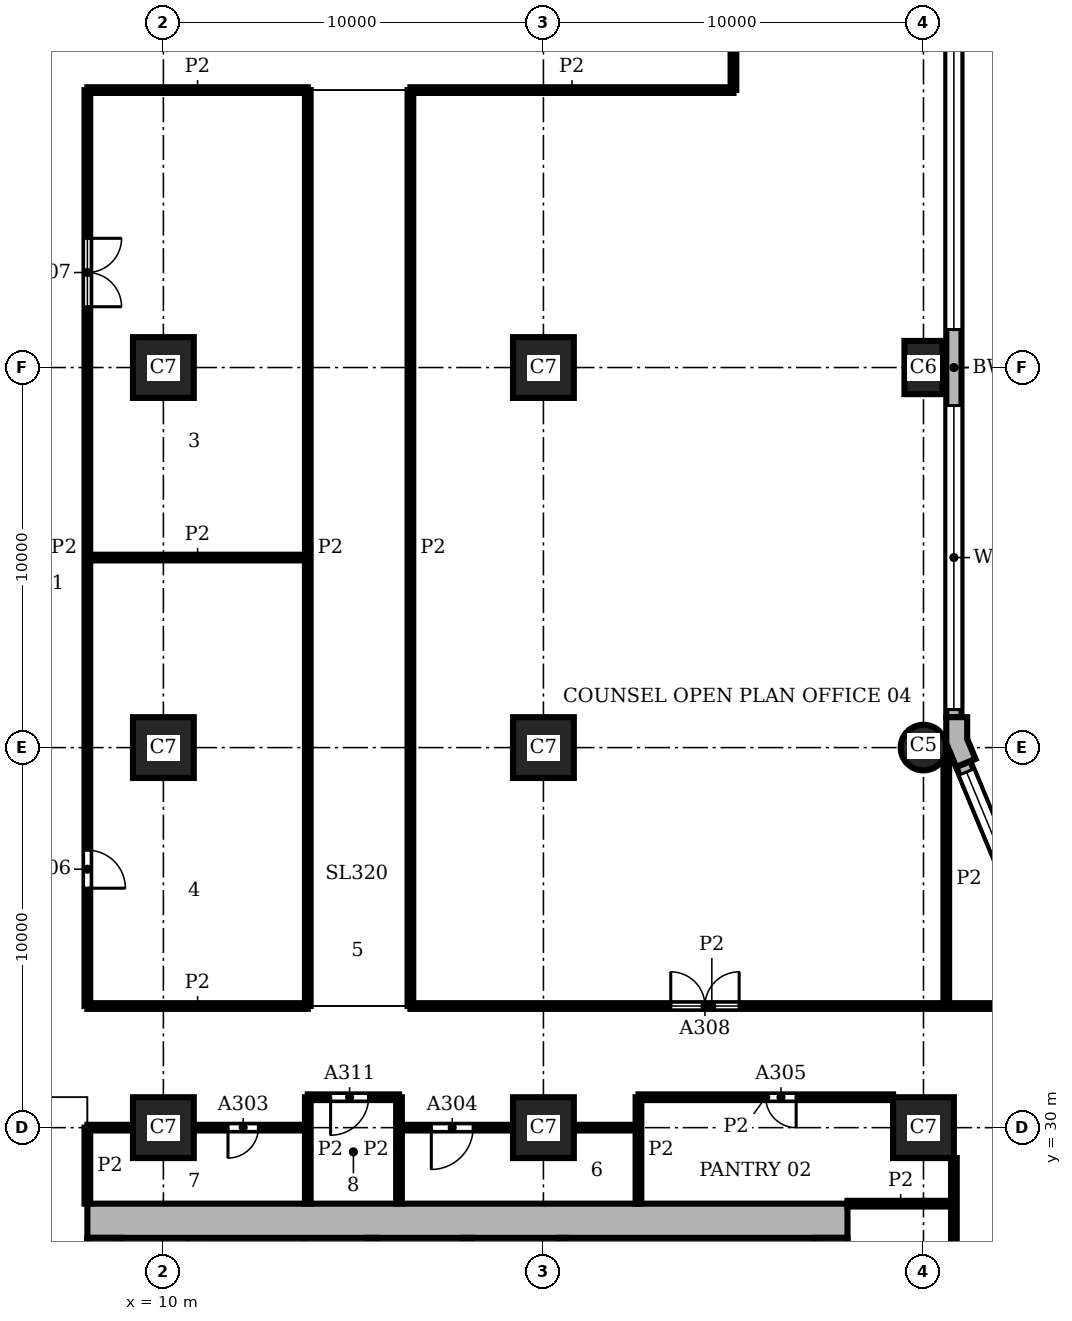
"""IFC4 building model, lengths in metres.
Left out: names, types, materials, properties, quantities, classifications, styles, units other than length and angle.
Written with IfcOpenShell. Run it as: python <this file> out.ifc"""

import sys

from ifc_helpers import new_model, si_unit, direction, frame, frame_2d, origin, origin_2d, place, context, subcontext, project, spatial, polyline, rectangle, circle, outline, extrude, element, fill, save


model = new_model("IFC4")
c1 = context("Model", 3, precision=1e-05, world=origin(), true_north=direction((0.0, 1.0)))
c2 = subcontext(c1, "Body", "Model", "MODEL_VIEW")
j1 = project(units=[si_unit("LENGTHUNIT", "METRE"), si_unit("PLANEANGLEUNIT", "RADIAN")], contexts=[c1])
p1 = place(None, origin())
s1 = spatial("IfcSite", under=j1, at=p1, CompositionType="ELEMENT")
p2 = place(p1, origin())
s2 = spatial("IfcBuilding", under=s1, at=p2, CompositionType="ELEMENT")
p3 = place(p2, frame((0.0, 0.0, 35.4)))
s3 = spatial("IfcBuildingStorey", under=s2, at=p3, CompositionType="ELEMENT", Elevation=35.4)
p4 = place(p3, frame((30.0, 40.0, 0.0), z_axis=(0.0, 0.0, 1.0), x_axis=(1.0, 0.0, 0.0)))
e1 = element("IfcColumn", 1, at=p4, inside=s3, PredefinedType="COLUMN", context=c2, shape_type="SweptSolid", body=[
    extrude(circle(Radius=0.6, at=origin_2d()), origin(), (0.0, 0.0, 1.0), 3.9),
])
p5 = place(p3, frame((30.0, 50.0, 0.0), z_axis=(0.0, 0.0, 1.0), x_axis=(0.0, 1.0, 0.0)))
e2 = element("IfcColumn", 2, at=p5, inside=s3, PredefinedType="COLUMN", context=c2, shape_type="SweptSolid", body=[
    extrude(rectangle(XDim=1.4, YDim=1.0, at=origin_2d()), origin(), (0.0, 0.0, 1.0), 3.9),
])
for number, where, z_axis, x_axis in (
    (3, (10.0, 30.0, 0.0), (0.0, 0.0, 1.0), (1.0, 0.0, 0.0)),
    (4, (10.0, 40.0, 0.0), (0.0, 0.0, 1.0), (1.0, 0.0, 0.0)),
    (5, (10.0, 50.0, 0.0), (0.0, 0.0, 1.0), (1.0, 0.0, 0.0)),
    (6, (20.0, 30.0, 0.0), (0.0, 0.0, 1.0), (1.0, 0.0, 0.0)),
    (7, (20.0, 40.0, 0.0), (0.0, 0.0, 1.0), (1.0, 0.0, 0.0)),
    (8, (20.0, 50.0, 0.0), (0.0, 0.0, 1.0), (1.0, 0.0, 0.0)),
    (9, (30.0, 30.0, 0.0), (0.0, 0.0, 1.0), (1.0, 0.0, 0.0)),
):
    element("IfcColumn", number, at=place(p3, frame(where, z_axis=z_axis, x_axis=x_axis)), inside=s3, PredefinedType="COLUMN", context=c2, shape_type="SweptSolid", body=[
        extrude(rectangle(XDim=1.6, YDim=1.6, at=origin_2d()), origin(), (0.0, 0.0, 1.0), 3.9),
    ])
p6 = place(p3, frame((27.55, 8.9, 0.0), z_axis=(0.0, 0.0, 1.0), x_axis=(0.0, 1.0, 0.0)))
e10 = element("IfcWall", 10, at=p6, inside=s3, PredefinedType="SHEAR", context=c2, shape_type="SweptSolid", body=[
    extrude(rectangle(XDim=18.2, YDim=0.9, at=frame_2d((9.1, 0.0))), origin(), (0.0, 0.0, 1.0), 3.9),
])
p7 = place(p6, frame((4.55, 0.0, 0.0)))
e11 = element("IfcOpeningElement", 11, at=p7, cuts=e10, PredefinedType="OPENING", context=c2, shape_type="SweptSolid", body=[
    extrude(rectangle(XDim=1.6, YDim=2.1, at=frame_2d((0.8, 1.05))), frame((0.0, 0.46, 0.0), z_axis=(0.0, -1.0, 0.0), x_axis=(1.0, 0.0, 0.0)), (0.0, 0.0, 1.0), 0.92),
])
p8 = place(p3, frame((28.0, 27.55, 0.0), z_axis=(0.0, 0.0, 1.0), x_axis=(-1.0, 0.0, 0.0)))
e12 = element("IfcWall", 12, at=p8, inside=s3, PredefinedType="SHEAR", context=c2, shape_type="SweptSolid", body=[
    extrude(rectangle(XDim=20.0, YDim=0.9, at=frame_2d((10.0, 0.0))), origin(), (0.0, 0.0, 1.0), 3.9),
])
p9 = place(p3, frame((8.45, 27.1, 0.0), z_axis=(0.0, 0.0, 1.0), x_axis=(0.0, -1.0, 0.0)))
e13 = element("IfcWall", 13, at=p9, inside=s3, PredefinedType="SHEAR", context=c2, shape_type="SweptSolid", body=[
    extrude(rectangle(XDim=18.2, YDim=0.9, at=frame_2d((9.1, 0.0))), origin(), (0.0, 0.0, 1.0), 3.9),
])
p10 = place(p3, origin())
e14 = element("IfcWall", 14, at=p10, inside=s3, PredefinedType="SOLIDWALL", context=c2, shape_type="SweptSolid", body=[
    extrude(outline(polyline([(31.23, 39.644), (31.369, 39.701), (31.15, 40.229), (31.15, 40.8), (31.0, 40.8), (30.6, 40.8), (30.6, 40.119), (30.861, 39.49), (31.23, 39.644)])), origin(), (0.0, 0.0, 1.0), 3.9),
])
p11 = place(p3, frame((33.362, 33.974, 0.0), z_axis=(0.0, 0.0, 1.0), x_axis=(-0.382655745237, 0.923891000409, 0.0)))
e15 = element("IfcWall", 15, at=p11, inside=s3, PredefinedType="SOLIDWALL", context=c2, shape_type="SweptSolid", body=[
    extrude(rectangle(XDim=6.053, YDim=0.4, at=frame_2d((3.027, 0.0))), origin(), (0.0, 0.0, 1.0), 3.9),
])
p12 = place(p11, frame((0.227, 0.0, 0.9)))
e16 = element("IfcOpeningElement", 16, at=p12, cuts=e15, PredefinedType="OPENING", context=c2, shape_type="SweptSolid", body=[
    extrude(rectangle(XDim=5.6, YDim=2.35, at=frame_2d((2.8, 1.175))), frame((0.0, 0.21, 0.0), z_axis=(0.0, -1.0, 0.0), x_axis=(1.0, 0.0, 0.0)), (0.0, 0.0, 1.0), 0.42),
])
p13 = place(p3, frame((30.8, 40.8, 0.0), z_axis=(0.0, 0.0, 1.0), x_axis=(0.0, 1.0, 0.0)))
e17 = element("IfcWall", 17, at=p13, inside=s3, PredefinedType="SOLIDWALL", context=c2, shape_type="SweptSolid", body=[
    extrude(rectangle(XDim=18.4, YDim=0.4, at=frame_2d((9.2, 0.0))), origin(), (0.0, 0.0, 1.0), 3.9),
])
p14 = place(p13, frame((0.2, 0.0, 0.9)))
e18 = element("IfcOpeningElement", 18, at=p14, cuts=e17, PredefinedType="OPENING", context=c2, shape_type="SweptSolid", body=[
    extrude(rectangle(XDim=8.0, YDim=2.35, at=frame_2d((4.0, 1.175))), frame((0.0, 0.21, 0.0), z_axis=(0.0, -1.0, 0.0), x_axis=(1.0, 0.0, 0.0)), (0.0, 0.0, 1.0), 0.42),
])
p15 = place(p13, frame((10.2, 0.0, 0.9)))
e19 = element("IfcOpeningElement", 19, at=p15, cuts=e17, PredefinedType="OPENING", context=c2, shape_type="SweptSolid", body=[
    extrude(rectangle(XDim=8.0, YDim=2.35, at=frame_2d((4.0, 1.175))), frame((0.0, 0.21, 0.0), z_axis=(0.0, -1.0, 0.0), x_axis=(1.0, 0.0, 0.0)), (0.0, 0.0, 1.0), 0.42),
])
p16 = place(p3, frame((15.5, 23.6, 0.0), z_axis=(0.0, 0.0, 1.0), x_axis=(0.0, 1.0, 0.0)))
e20 = element("IfcWall", 20, at=p16, inside=s3, PredefinedType="SHEAR", context=c2, shape_type="SweptSolid", body=[
    extrude(rectangle(XDim=3.5, YDim=0.2, at=frame_2d((1.75, 0.0))), origin(), (0.0, 0.0, 1.0), 3.58),
])
p17 = place(p3, frame((18.0, 20.0, 0.0), z_axis=(0.0, 0.0, 1.0), x_axis=(0.0, 1.0, 0.0)))
e21 = element("IfcWall", 21, at=p17, inside=s3, PredefinedType="SHEAR", context=c2, shape_type="SweptSolid", body=[
    extrude(rectangle(XDim=7.1, YDim=0.2, at=frame_2d((3.55, 0.0))), origin(), (0.0, 0.0, 1.0), 3.58),
])
p18 = place(p17, frame((1.2, 0.0, 0.0)))
e22 = element("IfcOpeningElement", 22, at=p18, cuts=e21, PredefinedType="OPENING", context=c2, shape_type="SweptSolid", body=[
    extrude(rectangle(XDim=1.2, YDim=2.1, at=frame_2d((0.6, 1.05))), frame((0.0, 0.11, 0.0), z_axis=(0.0, -1.0, 0.0), x_axis=(1.0, 0.0, 0.0)), (0.0, 0.0, 1.0), 0.22),
])
p19 = place(p3, frame((20.5, 23.6, 0.0), z_axis=(0.0, 0.0, 1.0), x_axis=(0.0, 1.0, 0.0)))
e23 = element("IfcWall", 23, at=p19, inside=s3, PredefinedType="SHEAR", context=c2, shape_type="SweptSolid", body=[
    extrude(rectangle(XDim=3.5, YDim=0.2, at=frame_2d((1.75, 0.0))), origin(), (0.0, 0.0, 1.0), 3.58),
])
p20 = place(p3, frame((8.0, 28.0, 0.0), z_axis=(0.0, 0.0, 1.0), x_axis=(0.0, 1.0, 0.0)))
e24 = element("IfcWall", 24, at=p20, inside=s3, PredefinedType="PARTITIONING", context=c2, shape_type="SweptSolid", body=[
    extrude(rectangle(XDim=2.0, YDim=0.15, at=frame_2d((1.0, 0.0))), origin(), (0.0, 0.0, 1.0), 3.58),
])
p21 = place(p3, frame((8.0, 33.2, 0.0), z_axis=(0.0, 0.0, 1.0), x_axis=(0.0, 1.0, 0.0)))
e25 = element("IfcWall", 25, at=p21, inside=s3, PredefinedType="PARTITIONING", context=c2, shape_type="SweptSolid", body=[
    extrude(rectangle(XDim=24.1, YDim=0.15, at=frame_2d((12.05, 0.0))), origin(), (0.0, 0.0, 1.0), 3.58),
])
p22 = place(p21, frame((3.1, 0.0, 0.0)))
e26 = element("IfcOpeningElement", 26, at=p22, cuts=e25, PredefinedType="OPENING", context=c2, shape_type="SweptSolid", body=[
    extrude(rectangle(XDim=1.0, YDim=2.1, at=frame_2d((0.5, 1.05))), frame((0.0, 0.085, 0.0), z_axis=(0.0, -1.0, 0.0), x_axis=(1.0, 0.0, 0.0)), (0.0, 0.0, 1.0), 0.17),
])
p23 = place(p21, frame((18.4, 0.0, 0.0)))
e27 = element("IfcOpeningElement", 27, at=p23, cuts=e25, PredefinedType="OPENING", context=c2, shape_type="SweptSolid", body=[
    extrude(rectangle(XDim=1.8, YDim=2.1, at=frame_2d((0.9, 1.05))), frame((0.0, 0.085, 0.0), z_axis=(0.0, -1.0, 0.0), x_axis=(1.0, 0.0, 0.0)), (0.0, 0.0, 1.0), 0.17),
])
p24 = place(p3, frame((13.8, 28.0, 0.0), z_axis=(0.0, 0.0, 1.0), x_axis=(0.0, 1.0, 0.0)))
e28 = element("IfcWall", 28, at=p24, inside=s3, PredefinedType="PARTITIONING", context=c2, shape_type="SweptSolid", body=[
    extrude(rectangle(XDim=2.8, YDim=0.15, at=frame_2d((1.4, 0.0))), origin(), (0.0, 0.0, 1.0), 3.58),
])
p25 = place(p3, frame((13.8, 33.2, 0.0), z_axis=(0.0, 0.0, 1.0), x_axis=(0.0, 1.0, 0.0)))
e29 = element("IfcWall", 29, at=p25, inside=s3, PredefinedType="PARTITIONING", context=c2, shape_type="SweptSolid", body=[
    extrude(rectangle(XDim=24.1, YDim=0.15, at=frame_2d((12.05, 0.0))), origin(), (0.0, 0.0, 1.0), 3.58),
])
p26 = place(p3, frame((16.2, 28.0, 0.0), z_axis=(0.0, 0.0, 1.0), x_axis=(0.0, 1.0, 0.0)))
e30 = element("IfcWall", 30, at=p26, inside=s3, PredefinedType="PARTITIONING", context=c2, shape_type="SweptSolid", body=[
    extrude(rectangle(XDim=2.8, YDim=0.15, at=frame_2d((1.4, 0.0))), origin(), (0.0, 0.0, 1.0), 3.58),
])
p27 = place(p3, frame((16.5, 33.2, 0.0), z_axis=(0.0, 0.0, 1.0), x_axis=(0.0, 1.0, 0.0)))
e31 = element("IfcWall", 31, at=p27, inside=s3, PredefinedType="PARTITIONING", context=c2, shape_type="SweptSolid", body=[
    extrude(rectangle(XDim=24.1, YDim=0.15, at=frame_2d((12.05, 0.0))), origin(), (0.0, 0.0, 1.0), 3.58),
])
p28 = place(p3, frame((22.5, 28.0, 0.0), z_axis=(0.0, 0.0, 1.0), x_axis=(0.0, 1.0, 0.0)))
e32 = element("IfcWall", 32, at=p28, inside=s3, PredefinedType="PARTITIONING", context=c2, shape_type="SweptSolid", body=[
    extrude(rectangle(XDim=2.8, YDim=0.15, at=frame_2d((1.4, 0.0))), origin(), (0.0, 0.0, 1.0), 3.58),
])
p29 = place(p3, frame((25.0, 57.3, 0.0), z_axis=(0.0, 0.0, 1.0), x_axis=(0.0, 1.0, 0.0)))
e33 = element("IfcWall", 33, at=p29, inside=s3, PredefinedType="PARTITIONING", context=c2, shape_type="SweptSolid", body=[
    extrude(rectangle(XDim=2.7, YDim=0.15, at=frame_2d((1.35, 0.0))), origin(), (0.0, 0.0, 1.0), 3.58),
])
p30 = place(p3, frame((30.6, 33.2, 0.0), z_axis=(0.0, 0.0, 1.0), x_axis=(0.0, 1.0, 0.0)))
e34 = element("IfcWall", 34, at=p30, inside=s3, PredefinedType="PARTITIONING", context=c2, shape_type="SweptSolid", body=[
    extrude(rectangle(XDim=6.699, YDim=0.15, at=frame_2d((3.35, 0.0))), origin(), (0.0, 0.0, 1.0), 3.58),
])
p31 = place(p3, frame((30.8, 20.8, 0.0), z_axis=(0.0, 0.0, 1.0), x_axis=(0.0, 1.0, 0.0)))
e35 = element("IfcWall", 35, at=p31, inside=s3, PredefinedType="PARTITIONING", context=c2, shape_type="SweptSolid", body=[
    extrude(rectangle(XDim=8.4, YDim=0.15, at=frame_2d((4.2, 0.0))), origin(), (0.0, 0.0, 1.0), 3.58),
])
p32 = place(p31, frame((3.3, 0.0, 0.0)))
e36 = element("IfcOpeningElement", 36, at=p32, cuts=e35, PredefinedType="OPENING", context=c2, shape_type="SweptSolid", body=[
    extrude(rectangle(XDim=1.1, YDim=2.1, at=frame_2d((0.55, 1.05))), frame((0.0, 0.085, 0.0), z_axis=(0.0, -1.0, 0.0), x_axis=(1.0, 0.0, 0.0)), (0.0, 0.0, 1.0), 0.17),
])
p33 = place(p3, frame((28.0, 28.0, 0.0), z_axis=(0.0, 0.0, 1.0), x_axis=(1.0, 0.0, 0.0)))
e37 = element("IfcWall", 37, at=p33, inside=s3, PredefinedType="PARTITIONING", context=c2, shape_type="SweptSolid", body=[
    extrude(rectangle(XDim=2.8, YDim=0.15, at=frame_2d((1.4, 0.0))), origin(), (0.0, 0.0, 1.0), 3.58),
])
p34 = place(p3, frame((8.0, 30.0, 0.0), z_axis=(0.0, 0.0, 1.0), x_axis=(1.0, 0.0, 0.0)))
e38 = element("IfcWall", 38, at=p34, inside=s3, PredefinedType="PARTITIONING", context=c2, shape_type="SweptSolid", body=[
    extrude(rectangle(XDim=1.2, YDim=0.15, at=frame_2d((0.6, 0.0))), origin(), (0.0, 0.0, 1.0), 3.58),
])
p35 = place(p3, frame((10.8, 30.0, 0.0), z_axis=(0.0, 0.0, 1.0), x_axis=(1.0, 0.0, 0.0)))
e39 = element("IfcWall", 39, at=p35, inside=s3, PredefinedType="PARTITIONING", context=c2, shape_type="SweptSolid", body=[
    extrude(rectangle(XDim=3.0, YDim=0.15, at=frame_2d((1.5, 0.0))), origin(), (0.0, 0.0, 1.0), 3.58),
])
p36 = place(p35, frame((0.9, 0.0, 0.0)))
e40 = element("IfcOpeningElement", 40, at=p36, cuts=e39, PredefinedType="OPENING", context=c2, shape_type="SweptSolid", body=[
    extrude(rectangle(XDim=0.8, YDim=2.1, at=frame_2d((0.4, 1.05))), frame((0.0, 0.085, 0.0), z_axis=(0.0, -1.0, 0.0), x_axis=(1.0, 0.0, 0.0)), (0.0, 0.0, 1.0), 0.17),
])
p37 = place(p3, frame((16.2, 30.0, 0.0), z_axis=(0.0, 0.0, 1.0), x_axis=(1.0, 0.0, 0.0)))
e41 = element("IfcWall", 41, at=p37, inside=s3, PredefinedType="PARTITIONING", context=c2, shape_type="SweptSolid", body=[
    extrude(rectangle(XDim=3.0, YDim=0.15, at=frame_2d((1.5, 0.0))), origin(), (0.0, 0.0, 1.0), 3.58),
])
p38 = place(p37, frame((0.85, 0.0, 0.0)))
e42 = element("IfcOpeningElement", 42, at=p38, cuts=e41, PredefinedType="OPENING", context=c2, shape_type="SweptSolid", body=[
    extrude(rectangle(XDim=1.1, YDim=2.1, at=frame_2d((0.55, 1.05))), frame((0.0, 0.085, 0.0), z_axis=(0.0, -1.0, 0.0), x_axis=(1.0, 0.0, 0.0)), (0.0, 0.0, 1.0), 0.17),
])
p39 = place(p3, frame((20.8, 30.0, 0.0), z_axis=(0.0, 0.0, 1.0), x_axis=(1.0, 0.0, 0.0)))
e43 = element("IfcWall", 43, at=p39, inside=s3, PredefinedType="PARTITIONING", context=c2, shape_type="SweptSolid", body=[
    extrude(rectangle(XDim=1.7, YDim=0.15, at=frame_2d((0.85, 0.0))), origin(), (0.0, 0.0, 1.0), 3.58),
])
p40 = place(p3, frame((13.8, 30.8, 0.0), z_axis=(0.0, 0.0, 1.0), x_axis=(1.0, 0.0, 0.0)))
e44 = element("IfcWall", 44, at=p40, inside=s3, PredefinedType="PARTITIONING", context=c2, shape_type="SweptSolid", body=[
    extrude(rectangle(XDim=2.4, YDim=0.15, at=frame_2d((1.2, 0.0))), origin(), (0.0, 0.0, 1.0), 3.58),
])
p41 = place(p40, frame((0.6, 0.0, 0.0)))
e45 = element("IfcOpeningElement", 45, at=p41, cuts=e44, PredefinedType="OPENING", context=c2, shape_type="SweptSolid", body=[
    extrude(rectangle(XDim=1.0, YDim=2.1, at=frame_2d((0.5, 1.05))), frame((0.0, 0.085, 0.0), z_axis=(0.0, -1.0, 0.0), x_axis=(1.0, 0.0, 0.0)), (0.0, 0.0, 1.0), 0.17),
])
p42 = place(p3, frame((22.5, 30.8, 0.0), z_axis=(0.0, 0.0, 1.0), x_axis=(1.0, 0.0, 0.0)))
e46 = element("IfcWall", 46, at=p42, inside=s3, PredefinedType="PARTITIONING", context=c2, shape_type="SweptSolid", body=[
    extrude(rectangle(XDim=6.7, YDim=0.15, at=frame_2d((3.35, 0.0))), origin(), (0.0, 0.0, 1.0), 3.58),
])
p43 = place(p42, frame((3.35, 0.0, 0.0)))
e47 = element("IfcOpeningElement", 47, at=p43, cuts=e46, PredefinedType="OPENING", context=c2, shape_type="SweptSolid", body=[
    extrude(rectangle(XDim=0.8, YDim=2.1, at=frame_2d((0.4, 1.05))), frame((0.0, 0.085, 0.0), z_axis=(0.0, -1.0, 0.0), x_axis=(1.0, 0.0, 0.0)), (0.0, 0.0, 1.0), 0.17),
])
p44 = place(p3, frame((8.0, 33.2, 0.0), z_axis=(0.0, 0.0, 1.0), x_axis=(1.0, 0.0, 0.0)))
e48 = element("IfcWall", 48, at=p44, inside=s3, PredefinedType="PARTITIONING", context=c2, shape_type="SweptSolid", body=[
    extrude(rectangle(XDim=5.8, YDim=0.15, at=frame_2d((2.9, 0.0))), origin(), (0.0, 0.0, 1.0), 3.58),
])
p45 = place(p3, frame((16.5, 33.2, 0.0), z_axis=(0.0, 0.0, 1.0), x_axis=(1.0, 0.0, 0.0)))
e49 = element("IfcWall", 49, at=p45, inside=s3, PredefinedType="PARTITIONING", context=c2, shape_type="SweptSolid", body=[
    extrude(rectangle(XDim=15.862, YDim=0.15, at=frame_2d((7.931, 0.0))), origin(), (0.0, 0.0, 1.0), 3.58),
])
p46 = place(p45, frame((6.85, 0.0, 0.0)))
e50 = element("IfcOpeningElement", 50, at=p46, cuts=e49, PredefinedType="OPENING", context=c2, shape_type="SweptSolid", body=[
    extrude(rectangle(XDim=1.8, YDim=2.1, at=frame_2d((0.9, 1.05))), frame((0.0, 0.085, 0.0), z_axis=(0.0, -1.0, 0.0), x_axis=(1.0, 0.0, 0.0)), (0.0, 0.0, 1.0), 0.17),
])
for number, where, z_axis, x_axis in (
    (51, (8.0, 45.0, 0.0), (0.0, 0.0, 1.0), (1.0, 0.0, 0.0)),
    (52, (8.0, 57.3, 0.0), (0.0, 0.0, 1.0), (1.0, 0.0, 0.0)),
):
    element("IfcWall", number, at=place(p3, frame(where, z_axis=z_axis, x_axis=x_axis)), inside=s3, PredefinedType="PARTITIONING", context=c2, shape_type="SweptSolid", body=[
        extrude(rectangle(XDim=5.8, YDim=0.15, at=frame_2d((2.9, 0.0))), origin(), (0.0, 0.0, 1.0), 3.58),
    ])
p47 = place(p3, frame((16.5, 57.3, 0.0), z_axis=(0.0, 0.0, 1.0), x_axis=(1.0, 0.0, 0.0)))
e53 = element("IfcWall", 53, at=p47, inside=s3, PredefinedType="PARTITIONING", context=c2, shape_type="SweptSolid", body=[
    extrude(rectangle(XDim=8.5, YDim=0.15, at=frame_2d((4.25, 0.0))), origin(), (0.0, 0.0, 1.0), 3.58),
])
p48 = place(p12, origin())
e54 = element("IfcWindow", 54, at=p48, inside=s3, PartitioningType="SINGLE_PANEL", PredefinedType="WINDOW", context=c2, shape_type="SweptSolid", body=[
    extrude(rectangle(XDim=5.6, YDim=2.35, at=frame_2d((2.8, 1.175))), frame((0.0, 0.16, 0.0), z_axis=(0.0, -1.0, 0.0), x_axis=(1.0, 0.0, 0.0)), (0.0, 0.0, 1.0), 0.06),
])
fill(e16, e54)
p49 = place(p14, origin())
e55 = element("IfcWindow", 55, at=p49, inside=s3, PartitioningType="SINGLE_PANEL", PredefinedType="WINDOW", context=c2, shape_type="SweptSolid", body=[
    extrude(rectangle(XDim=8.0, YDim=2.35, at=frame_2d((4.0, 1.175))), frame((0.0, 0.16, 0.0), z_axis=(0.0, -1.0, 0.0), x_axis=(1.0, 0.0, 0.0)), (0.0, 0.0, 1.0), 0.06),
])
fill(e18, e55)
p50 = place(p15, origin())
e56 = element("IfcWindow", 56, at=p50, inside=s3, PartitioningType="SINGLE_PANEL", PredefinedType="WINDOW", context=c2, shape_type="SweptSolid", body=[
    extrude(rectangle(XDim=8.0, YDim=2.35, at=frame_2d((4.0, 1.175))), frame((0.0, 0.16, 0.0), z_axis=(0.0, -1.0, 0.0), x_axis=(1.0, 0.0, 0.0)), (0.0, 0.0, 1.0), 0.06),
])
fill(e19, e56)
p51 = place(p36, frame((0.8, 0.0, 0.0), z_axis=(0.0, 0.0, 1.0), x_axis=(-1.0, 0.0, 0.0)))
e57 = element("IfcDoor", 57, at=p51, inside=s3, OperationType="SINGLE_SWING_RIGHT", PredefinedType="DOOR", context=c2, shape_type="SweptSolid", body=[
    extrude(rectangle(XDim=0.8, YDim=2.1, at=frame_2d((0.4, 1.05))), frame((0.0, 0.025, 0.0), z_axis=(0.0, -1.0, 0.0), x_axis=(1.0, 0.0, 0.0)), (0.0, 0.0, 1.0), 0.05),
])
fill(e40, e57)
p52 = place(p38, frame((1.1, 0.0, 0.0), z_axis=(0.0, 0.0, 1.0), x_axis=(-1.0, 0.0, 0.0)))
e58 = element("IfcDoor", 58, at=p52, inside=s3, OperationType="SINGLE_SWING_RIGHT", PredefinedType="DOOR", context=c2, shape_type="SweptSolid", body=[
    extrude(rectangle(XDim=1.1, YDim=2.1, at=frame_2d((0.55, 1.05))), frame((0.0, 0.025, 0.0), z_axis=(0.0, -1.0, 0.0), x_axis=(1.0, 0.0, 0.0)), (0.0, 0.0, 1.0), 0.05),
])
fill(e42, e58)
p53 = place(p43, frame((0.8, 0.0, 0.0), z_axis=(0.0, 0.0, 1.0), x_axis=(-1.0, 0.0, 0.0)))
e59 = element("IfcDoor", 59, at=p53, inside=s3, OperationType="SINGLE_SWING_LEFT", PredefinedType="DOOR", context=c2, shape_type="SweptSolid", body=[
    extrude(rectangle(XDim=0.8, YDim=2.1, at=frame_2d((0.4, 1.05))), frame((0.0, 0.025, 0.0), z_axis=(0.0, -1.0, 0.0), x_axis=(1.0, 0.0, 0.0)), (0.0, 0.0, 1.0), 0.05),
])
fill(e47, e59)
p54 = place(p22, frame((1.0, 0.0, 0.0), z_axis=(0.0, 0.0, 1.0), x_axis=(-1.0, 0.0, 0.0)))
e60 = element("IfcDoor", 60, at=p54, inside=s3, OperationType="SINGLE_SWING_RIGHT", PredefinedType="DOOR", context=c2, shape_type="SweptSolid", body=[
    extrude(rectangle(XDim=1.0, YDim=2.1, at=frame_2d((0.5, 1.05))), frame((0.0, 0.025, 0.0), z_axis=(0.0, -1.0, 0.0), x_axis=(1.0, 0.0, 0.0)), (0.0, 0.0, 1.0), 0.05),
])
fill(e26, e60)
p55 = place(p23, frame((1.8, 0.0, 0.0), z_axis=(0.0, 0.0, 1.0), x_axis=(-1.0, 0.0, 0.0)))
e61 = element("IfcDoor", 61, at=p55, inside=s3, OperationType="DOUBLE_DOOR_SINGLE_SWING", PredefinedType="DOOR", context=c2, shape_type="SweptSolid", body=[
    extrude(rectangle(XDim=1.8, YDim=2.1, at=frame_2d((0.9, 1.05))), frame((0.0, 0.025, 0.0), z_axis=(0.0, -1.0, 0.0), x_axis=(1.0, 0.0, 0.0)), (0.0, 0.0, 1.0), 0.05),
])
fill(e27, e61)
p56 = place(p46, origin())
e62 = element("IfcDoor", 62, at=p56, inside=s3, OperationType="DOUBLE_DOOR_SINGLE_SWING", PredefinedType="DOOR", context=c2, shape_type="SweptSolid", body=[
    extrude(rectangle(XDim=1.8, YDim=2.1, at=frame_2d((0.9, 1.05))), frame((0.0, 0.025, 0.0), z_axis=(0.0, -1.0, 0.0), x_axis=(1.0, 0.0, 0.0)), (0.0, 0.0, 1.0), 0.05),
])
fill(e50, e62)
p57 = place(p41, frame((1.0, 0.0, 0.0), z_axis=(0.0, 0.0, 1.0), x_axis=(-1.0, 0.0, 0.0)))
e63 = element("IfcDoor", 63, at=p57, inside=s3, OperationType="SINGLE_SWING_RIGHT", PredefinedType="DOOR", context=c2, shape_type="SweptSolid", body=[
    extrude(rectangle(XDim=1.0, YDim=2.1, at=frame_2d((0.5, 1.05))), frame((0.0, 0.025, 0.0), z_axis=(0.0, -1.0, 0.0), x_axis=(1.0, 0.0, 0.0)), (0.0, 0.0, 1.0), 0.05),
])
fill(e45, e63)
save(model, sys.argv[1])
